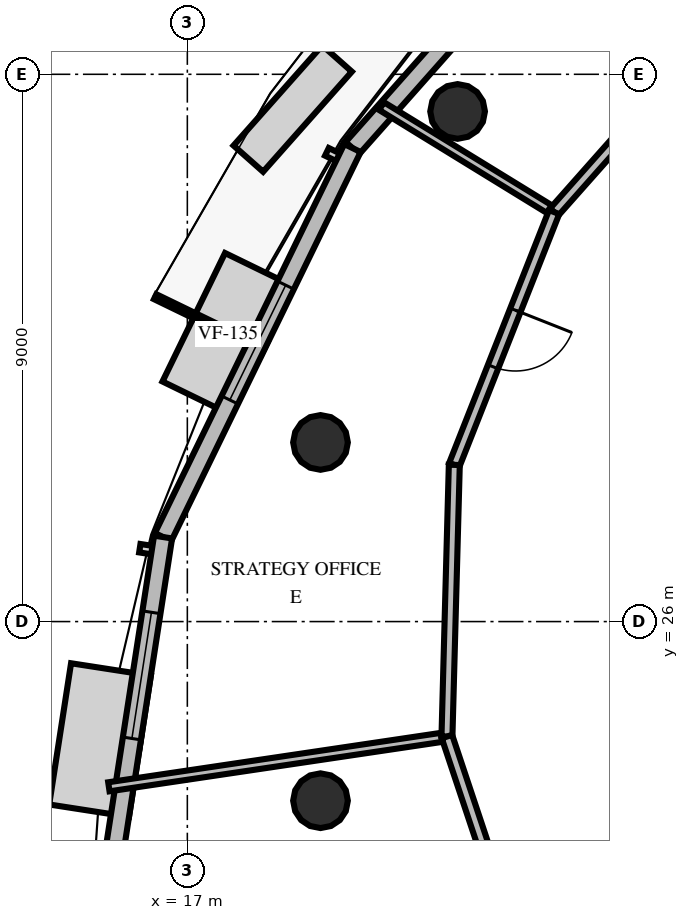
"""IFC4 building model, lengths in metres.
Left out: names, types, materials, properties, quantities, classifications, styles, units other than length and angle.
Written with IfcOpenShell. Run it as: python <this file> out.ifc"""

import sys

from ifc_helpers import new_model, si_unit, direction, frame, frame_2d, origin, origin_2d, place, context, subcontext, project, spatial, rectangle, circle, extrude, element, fill, save


model = new_model("IFC4")
c1 = context("Model", 3, precision=1e-05, world=origin(), true_north=direction((0.0, 1.0)))
c2 = subcontext(c1, "Body", "Model", "MODEL_VIEW")
j1 = project(units=[si_unit("LENGTHUNIT", "METRE"), si_unit("PLANEANGLEUNIT", "RADIAN")], contexts=[c1])
p1 = place(None, origin())
s1 = spatial("IfcSite", under=j1, at=p1, CompositionType="ELEMENT")
p2 = place(p1, origin())
s2 = spatial("IfcBuilding", under=s1, at=p2, CompositionType="ELEMENT")
p3 = place(p2, frame((0.0, 0.0, 234.0)))
s3 = spatial("IfcBuildingStorey", under=s2, at=p3, CompositionType="ELEMENT", Elevation=234.0)
for number, where, z_axis, x_axis in (
    (1, (21.445, 34.389, 0.0), (0.0, 0.0, 1.0), (1.0, 0.0, 0.0)),
    (2, (19.19, 28.946, 0.0), (0.0, 0.0, 1.0), (1.0, 0.0, 0.0)),
    (3, (19.19, 23.054, 0.0), (0.0, 0.0, 1.0), (1.0, 0.0, 0.0)),
):
    element("IfcColumn", number, at=place(p3, frame(where, z_axis=z_axis, x_axis=x_axis)), inside=s3, PredefinedType="COLUMN", context=c2, shape_type="SweptSolid", body=[
        extrude(circle(Radius=0.45, at=origin_2d()), origin(), (0.0, 0.0, 1.0), 3.6),
    ])
p4 = place(p3, frame((24.553, 39.246, 0.0), z_axis=(0.0, 0.0, 1.0), x_axis=(-0.663261925143, -0.748387345333, 0.0)))
e4 = element("IfcWall", 4, at=p4, inside=s3, PredefinedType="SOLIDWALL", context=c2, shape_type="SweptSolid", body=[
    extrude(rectangle(XDim=7.293, YDim=0.3, at=frame_2d((3.647, 0.0))), origin(), (0.0, 0.0, 1.0), 2.76),
])
p5 = place(p4, frame((2.19, 0.0, 0.0)))
e5 = element("IfcOpeningElement", 5, at=p5, cuts=e4, PredefinedType="OPENING", context=c2, shape_type="SweptSolid", body=[
    extrude(rectangle(XDim=1.05, YDim=2.15, at=frame_2d((0.525, 1.075))), frame((0.0, 0.16, 0.0), z_axis=(0.0, -1.0, 0.0), x_axis=(1.0, 0.0, 0.0)), (0.0, 0.0, 1.0), 0.32),
])
p6 = place(p3, frame((19.716, 33.787, 0.0), z_axis=(0.0, 0.0, 1.0), x_axis=(-0.437731914834, -0.899105539264, 0.0)))
e6 = element("IfcWall", 6, at=p6, inside=s3, PredefinedType="SOLIDWALL", context=c2, shape_type="SweptSolid", body=[
    extrude(rectangle(XDim=7.115, YDim=0.3, at=frame_2d((3.558, 0.0))), origin(), (0.0, 0.0, 1.0), 2.76),
])
p7 = place(p6, frame((2.508, 0.0, 0.8)))
e7 = element("IfcOpeningElement", 7, at=p7, cuts=e6, PredefinedType="OPENING", context=c2, shape_type="SweptSolid", body=[
    extrude(rectangle(XDim=2.1, YDim=1.85, at=frame_2d((1.05, 0.925))), frame((0.0, 0.16, 0.0), z_axis=(0.0, -1.0, 0.0), x_axis=(1.0, 0.0, 0.0)), (0.0, 0.0, 1.0), 0.32),
])
p8 = place(p3, frame((16.601, 27.39, 0.0), z_axis=(0.0, 0.0, 1.0), x_axis=(-0.15291596783, -0.988239195126, 0.0)))
e8 = element("IfcWall", 8, at=p8, inside=s3, PredefinedType="SOLIDWALL", context=c2, shape_type="SweptSolid", body=[
    extrude(rectangle(XDim=6.643, YDim=0.3, at=frame_2d((3.322, 0.0))), origin(), (0.0, 0.0, 1.0), 2.76),
])
p9 = place(p8, frame((1.252, 0.0, 0.8)))
e9 = element("IfcOpeningElement", 9, at=p9, cuts=e8, PredefinedType="OPENING", context=c2, shape_type="SweptSolid", body=[
    extrude(rectangle(XDim=2.1, YDim=1.85, at=frame_2d((1.05, 0.925))), frame((0.0, 0.16, 0.0), z_axis=(0.0, -1.0, 0.0), x_axis=(1.0, 0.0, 0.0)), (0.0, 0.0, 1.0), 0.32),
])
p10 = place(p3, frame((23.032, 32.734, 0.0), z_axis=(0.0, 0.0, 1.0), x_axis=(-0.852183839691, 0.523242490028, 0.0)))
e10 = element("IfcWall", 10, at=p10, inside=s3, PredefinedType="PARTITIONING", context=c2, shape_type="SweptSolid", body=[
    extrude(rectangle(XDim=3.331, YDim=0.15, at=frame_2d((1.666, 0.0))), origin(), (0.0, 0.0, 1.0), 2.46),
])
p11 = place(p3, frame((25.997, 36.079, 0.0), z_axis=(0.0, 0.0, 1.0), x_axis=(-0.663274838451, -0.748375900652, 0.0)))
e11 = element("IfcWall", 11, at=p11, inside=s3, PredefinedType="PARTITIONING", context=c2, shape_type="SweptSolid", body=[
    extrude(rectangle(XDim=4.47, YDim=0.18, at=frame_2d((2.235, 0.0))), origin(), (0.0, 0.0, 1.0), 2.46),
])
p12 = place(p11, frame((0.942, 0.0, 0.0)))
e12 = element("IfcOpeningElement", 12, at=p12, cuts=e11, PredefinedType="OPENING", context=c2, shape_type="SweptSolid", body=[
    extrude(rectangle(XDim=1.0, YDim=2.15, at=frame_2d((0.5, 1.075))), frame((0.0, 0.1, 0.0), z_axis=(0.0, -1.0, 0.0), x_axis=(1.0, 0.0, 0.0)), (0.0, 0.0, 1.0), 0.2),
])
p13 = place(p3, frame((21.27, 24.109, 0.0), z_axis=(0.0, 0.0, 1.0), x_axis=(-0.989139940233, -0.146976796248, 0.0)))
e13 = element("IfcWall", 13, at=p13, inside=s3, PredefinedType="PARTITIONING", context=c2, shape_type="SweptSolid", body=[
    extrude(rectangle(XDim=5.621, YDim=0.15, at=frame_2d((2.811, 0.0))), origin(), (0.0, 0.0, 1.0), 2.46),
])
p14 = place(p3, frame((23.032, 32.734, 0.0), z_axis=(0.0, 0.0, 1.0), x_axis=(-0.367328200365, -0.930091389712, 0.0)))
e14 = element("IfcWall", 14, at=p14, inside=s3, PredefinedType="PARTITIONING", context=c2, shape_type="SweptSolid", body=[
    extrude(rectangle(XDim=4.47, YDim=0.18, at=frame_2d((2.235, 0.0))), origin(), (0.0, 0.0, 1.0), 2.46),
])
p15 = place(p14, frame((1.735, 0.0, 0.0)))
e15 = element("IfcOpeningElement", 15, at=p15, cuts=e14, PredefinedType="OPENING", context=c2, shape_type="SweptSolid", body=[
    extrude(rectangle(XDim=1.0, YDim=2.15, at=frame_2d((0.5, 1.075))), frame((0.0, 0.1, 0.0), z_axis=(0.0, -1.0, 0.0), x_axis=(1.0, 0.0, 0.0)), (0.0, 0.0, 1.0), 0.2),
])
p16 = place(p3, frame((21.391, 28.577, 0.0), z_axis=(0.0, 0.0, 1.0), x_axis=(-0.027037813982, -0.99963441148, 0.0)))
e16 = element("IfcWall", 16, at=p16, inside=s3, PredefinedType="PARTITIONING", context=c2, shape_type="SweptSolid", body=[
    extrude(rectangle(XDim=4.47, YDim=0.18, at=frame_2d((2.235, 0.0))), origin(), (0.0, 0.0, 1.0), 2.46),
])
p17 = place(p3, frame((21.27, 24.109, 0.0), z_axis=(0.0, 0.0, 1.0), x_axis=(0.316473549496, -0.948601334845, 0.0)))
e17 = element("IfcWall", 17, at=p17, inside=s3, PredefinedType="PARTITIONING", context=c2, shape_type="SweptSolid", body=[
    extrude(rectangle(XDim=4.47, YDim=0.18, at=frame_2d((2.235, 0.0))), origin(), (0.0, 0.0, 1.0), 2.46),
])
p18 = place(p17, frame((2.527, 0.0, 0.0)))
e18 = element("IfcOpeningElement", 18, at=p18, cuts=e17, PredefinedType="OPENING", context=c2, shape_type="SweptSolid", body=[
    extrude(rectangle(XDim=1.0, YDim=2.15, at=frame_2d((0.5, 1.075))), frame((0.0, 0.1, 0.0), z_axis=(0.0, -1.0, 0.0), x_axis=(1.0, 0.0, 0.0)), (0.0, 0.0, 1.0), 0.2),
])
p19 = place(p7, origin())
e19 = element("IfcWindow", 19, at=p19, inside=s3, PartitioningType="SINGLE_PANEL", PredefinedType="WINDOW", context=c2, shape_type="SweptSolid", body=[
    extrude(rectangle(XDim=2.1, YDim=1.85, at=frame_2d((1.05, 0.925))), frame((0.0, 0.03, 0.0), z_axis=(0.0, -1.0, 0.0), x_axis=(1.0, 0.0, 0.0)), (0.0, 0.0, 1.0), 0.06),
])
fill(e7, e19)
p20 = place(p9, origin())
e20 = element("IfcWindow", 20, at=p20, inside=s3, PartitioningType="SINGLE_PANEL", PredefinedType="WINDOW", context=c2, shape_type="SweptSolid", body=[
    extrude(rectangle(XDim=2.1, YDim=1.85, at=frame_2d((1.05, 0.925))), frame((0.0, 0.03, 0.0), z_axis=(0.0, -1.0, 0.0), x_axis=(1.0, 0.0, 0.0)), (0.0, 0.0, 1.0), 0.06),
])
fill(e9, e20)
p21 = place(p15, origin())
e21 = element("IfcDoor", 21, at=p21, inside=s3, OperationType="SINGLE_SWING_LEFT", PredefinedType="DOOR", context=c2, shape_type="SweptSolid", body=[
    extrude(rectangle(XDim=1.0, YDim=2.15, at=frame_2d((0.5, 1.075))), frame((0.0, 0.025, 0.0), z_axis=(0.0, -1.0, 0.0), x_axis=(1.0, 0.0, 0.0)), (0.0, 0.0, 1.0), 0.05),
])
fill(e15, e21)
save(model, sys.argv[1])
